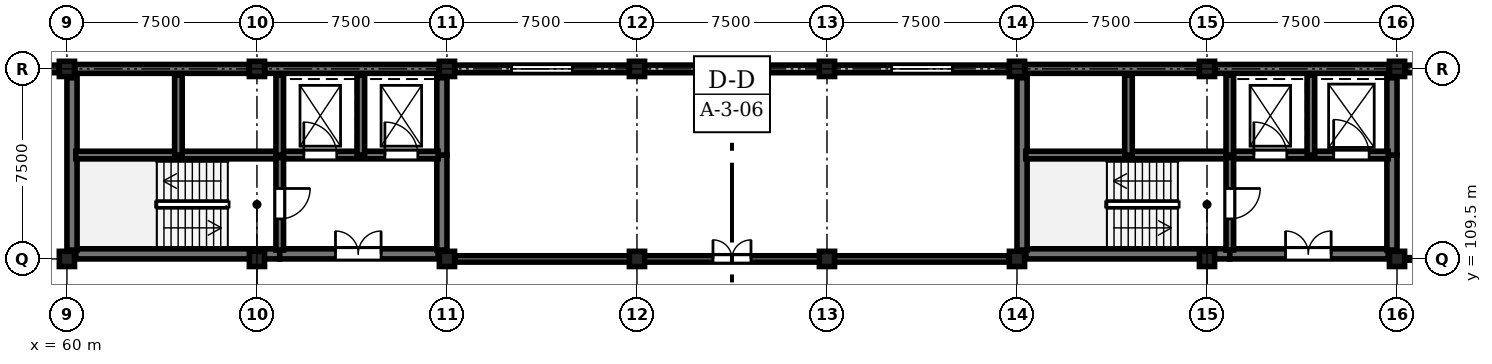
"""IFC4 building model, lengths in metres.
Left out: names, types, materials, properties, quantities, classifications, styles, units other than length and angle.
Written with IfcOpenShell. Run it as: python <this file> out.ifc"""

import sys

from ifc_helpers import new_model, si_unit, direction, frame, frame_2d, origin, origin_2d, place, context, subcontext, project, spatial, rectangle, circle, extrude, element, fill, save


model = new_model("IFC4")
c1 = context("Model", 3, precision=1e-05, world=origin(), true_north=direction((0.0, 1.0)))
c2 = subcontext(c1, "Body", "Model", "MODEL_VIEW")
j1 = project(units=[si_unit("LENGTHUNIT", "METRE"), si_unit("PLANEANGLEUNIT", "RADIAN")], contexts=[c1])
p1 = place(None, origin())
s1 = spatial("IfcSite", under=j1, at=p1, CompositionType="ELEMENT")
p2 = place(p1, origin())
s2 = spatial("IfcBuilding", under=s1, at=p2, CompositionType="ELEMENT")
p3 = place(p2, frame((0.0, 0.0, 14.1)))
s3 = spatial("IfcBuildingStorey", under=s2, at=p3, CompositionType="ELEMENT", Elevation=14.1)
for number, where, z_axis, x_axis in (
    (1, (60.0, 109.5, 0.0), (0.0, 0.0, 1.0), (1.0, 0.0, 0.0)),
    (2, (60.0, 117.0, 0.0), (0.0, 0.0, 1.0), (1.0, 0.0, 0.0)),
    (3, (67.5, 109.5, 0.0), (0.0, 0.0, 1.0), (1.0, 0.0, 0.0)),
):
    element("IfcColumn", number, at=place(p3, frame(where, z_axis=z_axis, x_axis=x_axis)), inside=s3, PredefinedType="COLUMN", context=c2, shape_type="SweptSolid", body=[
        extrude(rectangle(XDim=0.6, YDim=0.6, at=origin_2d()), origin(), (0.0, 0.0, 1.0), 3.75),
    ])
for number, where, z_axis, x_axis in (
    (4, (67.5, 117.0, 0.0), (0.0, 0.0, 1.0), (1.0, 0.0, 0.0)),
    (5, (75.0, 109.5, 0.0), (0.0, 0.0, 1.0), (1.0, 0.0, 0.0)),
):
    element("IfcColumn", number, at=place(p3, frame(where, z_axis=z_axis, x_axis=x_axis)), inside=s3, PredefinedType="COLUMN", context=c2, shape_type="SweptSolid", body=[
        extrude(circle(Radius=0.3, at=origin_2d()), origin(), (0.0, 0.0, 1.0), 3.75),
    ])
for number, where, z_axis, x_axis in (
    (6, (75.0, 117.0, 0.0), (0.0, 0.0, 1.0), (1.0, 0.0, 0.0)),
    (7, (82.5, 109.5, 0.0), (0.0, 0.0, 1.0), (1.0, 0.0, 0.0)),
    (8, (82.5, 117.0, 0.0), (0.0, 0.0, 1.0), (1.0, 0.0, 0.0)),
    (9, (90.0, 109.5, 0.0), (0.0, 0.0, 1.0), (1.0, 0.0, 0.0)),
):
    element("IfcColumn", number, at=place(p3, frame(where, z_axis=z_axis, x_axis=x_axis)), inside=s3, PredefinedType="COLUMN", context=c2, shape_type="SweptSolid", body=[
        extrude(rectangle(XDim=0.6, YDim=0.6, at=origin_2d()), origin(), (0.0, 0.0, 1.0), 3.75),
    ])
for number, where, z_axis, x_axis in (
    (10, (90.0, 117.0, 0.0), (0.0, 0.0, 1.0), (1.0, 0.0, 0.0)),
    (11, (97.5, 109.5, 0.0), (0.0, 0.0, 1.0), (1.0, 0.0, 0.0)),
):
    element("IfcColumn", number, at=place(p3, frame(where, z_axis=z_axis, x_axis=x_axis)), inside=s3, PredefinedType="COLUMN", context=c2, shape_type="SweptSolid", body=[
        extrude(circle(Radius=0.3, at=origin_2d()), origin(), (0.0, 0.0, 1.0), 3.75),
    ])
for number, where, z_axis, x_axis in (
    (12, (97.5, 117.0, 0.0), (0.0, 0.0, 1.0), (1.0, 0.0, 0.0)),
    (13, (105.0, 109.5, 0.0), (0.0, 0.0, 1.0), (1.0, 0.0, 0.0)),
    (14, (105.0, 117.0, 0.0), (0.0, 0.0, 1.0), (1.0, 0.0, 0.0)),
    (15, (112.5, 109.5, 0.0), (0.0, 0.0, 1.0), (1.0, 0.0, 0.0)),
):
    element("IfcColumn", number, at=place(p3, frame(where, z_axis=z_axis, x_axis=x_axis)), inside=s3, PredefinedType="COLUMN", context=c2, shape_type="SweptSolid", body=[
        extrude(rectangle(XDim=0.6, YDim=0.6, at=origin_2d()), origin(), (0.0, 0.0, 1.0), 3.75),
    ])
p4 = place(p3, frame((112.5, 117.0, 0.0), z_axis=(0.0, 0.0, 1.0), x_axis=(1.0, 0.0, 0.0)))
e16 = element("IfcColumn", 16, at=p4, inside=s3, PredefinedType="COLUMN", context=c2, shape_type="SweptSolid", body=[
    extrude(circle(Radius=0.3, at=origin_2d()), origin(), (0.0, 0.0, 1.0), 3.75),
])
p5 = place(p3, frame((52.785, 117.0, 0.0), z_axis=(0.0, 0.0, 1.0), x_axis=(1.0, 0.0, 0.0)))
e17 = element("IfcWall", 17, at=p5, inside=s3, PredefinedType="STANDARD", context=c2, shape_type="SweptSolid", body=[
    extrude(rectangle(XDim=6.905, YDim=0.3, at=frame_2d((3.453, 0.0))), origin(), (0.0, 0.0, 1.0), 2.87),
])
p6 = place(p5, frame((1.952, 0.0, 1.1)))
e18 = element("IfcOpeningElement", 18, at=p6, cuts=e17, PredefinedType="OPENING", context=c2, shape_type="SweptSolid", body=[
    extrude(rectangle(XDim=3.0, YDim=1.2, at=frame_2d((1.5, 0.6))), frame((0.0, 0.16, 0.0), z_axis=(0.0, -1.0, 0.0), x_axis=(1.0, 0.0, 0.0)), (0.0, 0.0, 1.0), 0.32),
])
for number, where, z_axis, x_axis in (
    (19, (60.31, 117.0, 0.0), (0.0, 0.0, 1.0), (1.0, 0.0, 0.0)),
    (20, (67.81, 117.0, 0.0), (0.0, 0.0, 1.0), (1.0, 0.0, 0.0)),
):
    element("IfcWall", number, at=place(p3, frame(where, z_axis=z_axis, x_axis=x_axis)), inside=s3, PredefinedType="SHEAR", context=c2, shape_type="SweptSolid", body=[
        extrude(rectangle(XDim=6.88, YDim=0.35, at=frame_2d((3.44, 0.0))), origin(), (0.0, 0.0, 1.0), 3.47),
    ])
p7 = place(p3, frame((75.31, 117.0, 0.0), z_axis=(0.0, 0.0, 1.0), x_axis=(1.0, 0.0, 0.0)))
e21 = element("IfcWall", 21, at=p7, inside=s3, PredefinedType="STANDARD", context=c2, shape_type="SweptSolid", body=[
    extrude(rectangle(XDim=6.88, YDim=0.3, at=frame_2d((3.44, 0.0))), origin(), (0.0, 0.0, 1.0), 2.87),
])
p8 = place(p7, frame((2.24, 0.0, 1.1)))
e22 = element("IfcOpeningElement", 22, at=p8, cuts=e21, PredefinedType="OPENING", context=c2, shape_type="SweptSolid", body=[
    extrude(rectangle(XDim=2.4, YDim=1.2, at=frame_2d((1.2, 0.6))), frame((0.0, 0.16, 0.0), z_axis=(0.0, -1.0, 0.0), x_axis=(1.0, 0.0, 0.0)), (0.0, 0.0, 1.0), 0.32),
])
p9 = place(p3, frame((82.81, 117.0, 0.0), z_axis=(0.0, 0.0, 1.0), x_axis=(1.0, 0.0, 0.0)))
e23 = element("IfcWall", 23, at=p9, inside=s3, PredefinedType="STANDARD", context=c2, shape_type="SweptSolid", body=[
    extrude(rectangle(XDim=6.88, YDim=0.3, at=frame_2d((3.44, 0.0))), origin(), (0.0, 0.0, 1.0), 2.87),
])
p10 = place(p9, frame((1.94, 0.0, 1.1)))
e24 = element("IfcOpeningElement", 24, at=p10, cuts=e23, PredefinedType="OPENING", context=c2, shape_type="SweptSolid", body=[
    extrude(rectangle(XDim=3.0, YDim=1.2, at=frame_2d((1.5, 0.6))), frame((0.0, 0.16, 0.0), z_axis=(0.0, -1.0, 0.0), x_axis=(1.0, 0.0, 0.0)), (0.0, 0.0, 1.0), 0.32),
])
p11 = place(p3, frame((90.31, 117.0, 0.0), z_axis=(0.0, 0.0, 1.0), x_axis=(1.0, 0.0, 0.0)))
e25 = element("IfcWall", 25, at=p11, inside=s3, PredefinedType="STANDARD", context=c2, shape_type="SweptSolid", body=[
    extrude(rectangle(XDim=6.88, YDim=0.3, at=frame_2d((3.44, 0.0))), origin(), (0.0, 0.0, 1.0), 2.87),
])
p12 = place(p11, frame((2.24, 0.0, 1.1)))
e26 = element("IfcOpeningElement", 26, at=p12, cuts=e25, PredefinedType="OPENING", context=c2, shape_type="SweptSolid", body=[
    extrude(rectangle(XDim=2.4, YDim=1.2, at=frame_2d((1.2, 0.6))), frame((0.0, 0.16, 0.0), z_axis=(0.0, -1.0, 0.0), x_axis=(1.0, 0.0, 0.0)), (0.0, 0.0, 1.0), 0.32),
])
for number, where, z_axis, x_axis in (
    (27, (97.81, 117.0, 0.0), (0.0, 0.0, 1.0), (1.0, 0.0, 0.0)),
    (28, (105.31, 117.0, 0.0), (0.0, 0.0, 1.0), (1.0, 0.0, 0.0)),
):
    element("IfcWall", number, at=place(p3, frame(where, z_axis=z_axis, x_axis=x_axis)), inside=s3, PredefinedType="SHEAR", context=c2, shape_type="SweptSolid", body=[
        extrude(rectangle(XDim=6.88, YDim=0.35, at=frame_2d((3.44, 0.0))), origin(), (0.0, 0.0, 1.0), 3.47),
    ])
p13 = place(p3, frame((112.81, 117.0, 0.0), z_axis=(0.0, 0.0, 1.0), x_axis=(1.0, 0.0, 0.0)))
e29 = element("IfcWall", 29, at=p13, inside=s3, PredefinedType="STANDARD", context=c2, shape_type="SweptSolid", body=[
    extrude(rectangle(XDim=6.93, YDim=0.3, at=frame_2d((3.465, 0.0))), origin(), (0.0, 0.0, 1.0), 2.87),
])
p14 = place(p13, frame((1.965, 0.0, 1.1)))
e30 = element("IfcOpeningElement", 30, at=p14, cuts=e29, PredefinedType="OPENING", context=c2, shape_type="SweptSolid", body=[
    extrude(rectangle(XDim=3.0, YDim=1.2, at=frame_2d((1.5, 0.6))), frame((0.0, 0.16, 0.0), z_axis=(0.0, -1.0, 0.0), x_axis=(1.0, 0.0, 0.0)), (0.0, 0.0, 1.0), 0.32),
])
p15 = place(p3, frame((60.35, 109.7, 0.0), z_axis=(0.0, 0.0, 1.0), x_axis=(1.0, 0.0, 0.0)))
e31 = element("IfcWall", 31, at=p15, inside=s3, PredefinedType="SHEAR", context=c2, shape_type="SweptSolid", body=[
    extrude(rectangle(XDim=8.05, YDim=0.4, at=frame_2d((4.025, 0.0))), origin(), (0.0, 0.0, 1.0), 3.47),
])
p16 = place(p3, frame((68.4, 109.7, 0.0), z_axis=(0.0, 0.0, 1.0), x_axis=(1.0, 0.0, 0.0)))
e32 = element("IfcWall", 32, at=p16, inside=s3, PredefinedType="SHEAR", context=c2, shape_type="SweptSolid", body=[
    extrude(rectangle(XDim=6.25, YDim=0.4, at=frame_2d((3.125, 0.0))), origin(), (0.0, 0.0, 1.0), 3.47),
])
p17 = place(p16, frame((2.2, 0.0, 0.0)))
e33 = element("IfcOpeningElement", 33, at=p17, cuts=e32, PredefinedType="OPENING", context=c2, shape_type="SweptSolid", body=[
    extrude(rectangle(XDim=1.8, YDim=2.25, at=frame_2d((0.9, 1.125))), frame((0.0, 0.21, 0.0), z_axis=(0.0, -1.0, 0.0), x_axis=(1.0, 0.0, 0.0)), (0.0, 0.0, 1.0), 0.42),
])
p18 = place(p3, frame((60.2, 109.85, 0.0), z_axis=(0.0, 0.0, 1.0), x_axis=(0.0, 1.0, 0.0)))
e34 = element("IfcWall", 34, at=p18, inside=s3, PredefinedType="SHEAR", context=c2, shape_type="SweptSolid", body=[
    extrude(rectangle(XDim=6.8, YDim=0.4, at=frame_2d((3.4, 0.0))), origin(), (0.0, 0.0, 1.0), 3.47),
])
p19 = place(p3, frame((74.8, 109.85, 0.0), z_axis=(0.0, 0.0, 1.0), x_axis=(0.0, 1.0, 0.0)))
e35 = element("IfcWall", 35, at=p19, inside=s3, PredefinedType="SHEAR", context=c2, shape_type="SweptSolid", body=[
    extrude(rectangle(XDim=3.75, YDim=0.4, at=frame_2d((1.875, 0.0))), origin(), (0.0, 0.0, 1.0), 3.47),
])
p20 = place(p3, frame((74.8, 113.6, 0.0), z_axis=(0.0, 0.0, 1.0), x_axis=(0.0, 1.0, 0.0)))
e36 = element("IfcWall", 36, at=p20, inside=s3, PredefinedType="SHEAR", context=c2, shape_type="SweptSolid", body=[
    extrude(rectangle(XDim=3.05, YDim=0.4, at=frame_2d((1.525, 0.0))), origin(), (0.0, 0.0, 1.0), 3.47),
])
p21 = place(p3, frame((60.35, 113.6, 0.0), z_axis=(0.0, 0.0, 1.0), x_axis=(1.0, 0.0, 0.0)))
e37 = element("IfcWall", 37, at=p21, inside=s3, PredefinedType="SHEAR", context=c2, shape_type="SweptSolid", body=[
    extrude(rectangle(XDim=8.05, YDim=0.3, at=frame_2d((4.025, 0.0))), origin(), (0.0, 0.0, 1.0), 3.47),
])
p22 = place(p3, frame((68.4, 113.6, 0.0), z_axis=(0.0, 0.0, 1.0), x_axis=(1.0, 0.0, 0.0)))
e38 = element("IfcWall", 38, at=p22, inside=s3, PredefinedType="SHEAR", context=c2, shape_type="SweptSolid", body=[
    extrude(rectangle(XDim=6.25, YDim=0.3, at=frame_2d((3.125, 0.0))), origin(), (0.0, 0.0, 1.0), 3.47),
])
p23 = place(p22, frame((0.95, 0.0, 0.0)))
e39 = element("IfcOpeningElement", 39, at=p23, cuts=e38, PredefinedType="OPENING", context=c2, shape_type="SweptSolid", body=[
    extrude(rectangle(XDim=1.3, YDim=2.2, at=frame_2d((0.65, 1.1))), frame((0.0, 0.16, 0.0), z_axis=(0.0, -1.0, 0.0), x_axis=(1.0, 0.0, 0.0)), (0.0, 0.0, 1.0), 0.32),
])
p24 = place(p22, frame((4.15, 0.0, 0.0)))
e40 = element("IfcOpeningElement", 40, at=p24, cuts=e38, PredefinedType="OPENING", context=c2, shape_type="SweptSolid", body=[
    extrude(rectangle(XDim=1.3, YDim=2.2, at=frame_2d((0.65, 1.1))), frame((0.0, 0.16, 0.0), z_axis=(0.0, -1.0, 0.0), x_axis=(1.0, 0.0, 0.0)), (0.0, 0.0, 1.0), 0.32),
])
p25 = place(p3, frame((68.4, 113.5, 0.0), z_axis=(0.0, 0.0, 1.0), x_axis=(0.0, -1.0, 0.0)))
e41 = element("IfcWall", 41, at=p25, inside=s3, PredefinedType="SHEAR", context=c2, shape_type="SweptSolid", body=[
    extrude(rectangle(XDim=3.65, YDim=0.3, at=frame_2d((1.825, 0.0))), origin(), (0.0, 0.0, 1.0), 3.47),
])
p26 = place(p25, frame((1.22, 0.0, 0.0)))
e42 = element("IfcOpeningElement", 42, at=p26, cuts=e41, PredefinedType="OPENING", context=c2, shape_type="SweptSolid", body=[
    extrude(rectangle(XDim=1.2, YDim=2.25, at=frame_2d((0.6, 1.125))), frame((0.0, 0.16, 0.0), z_axis=(0.0, -1.0, 0.0), x_axis=(1.0, 0.0, 0.0)), (0.0, 0.0, 1.0), 0.32),
])
for number, where, z_axis, x_axis in (
    (43, (64.4, 113.6, 0.0), (0.0, 0.0, 1.0), (0.0, 1.0, 0.0)),
    (44, (68.4, 113.6, 0.0), (0.0, 0.0, 1.0), (0.0, 1.0, 0.0)),
    (45, (71.6, 113.6, 0.0), (0.0, 0.0, 1.0), (0.0, 1.0, 0.0)),
):
    element("IfcWall", number, at=place(p3, frame(where, z_axis=z_axis, x_axis=x_axis)), inside=s3, PredefinedType="SHEAR", context=c2, shape_type="SweptSolid", body=[
        extrude(rectangle(XDim=3.15, YDim=0.3, at=frame_2d((1.575, 0.0))), origin(), (0.0, 0.0, 1.0), 3.47),
    ])
p27 = place(p3, frame((97.85, 109.7, 0.0), z_axis=(0.0, 0.0, 1.0), x_axis=(1.0, 0.0, 0.0)))
e46 = element("IfcWall", 46, at=p27, inside=s3, PredefinedType="SHEAR", context=c2, shape_type="SweptSolid", body=[
    extrude(rectangle(XDim=8.05, YDim=0.4, at=frame_2d((4.025, 0.0))), origin(), (0.0, 0.0, 1.0), 3.47),
])
p28 = place(p3, frame((105.9, 109.7, 0.0), z_axis=(0.0, 0.0, 1.0), x_axis=(1.0, 0.0, 0.0)))
e47 = element("IfcWall", 47, at=p28, inside=s3, PredefinedType="SHEAR", context=c2, shape_type="SweptSolid", body=[
    extrude(rectangle(XDim=6.25, YDim=0.4, at=frame_2d((3.125, 0.0))), origin(), (0.0, 0.0, 1.0), 3.47),
])
p29 = place(p28, frame((2.2, 0.0, 0.0)))
e48 = element("IfcOpeningElement", 48, at=p29, cuts=e47, PredefinedType="OPENING", context=c2, shape_type="SweptSolid", body=[
    extrude(rectangle(XDim=1.8, YDim=2.25, at=frame_2d((0.9, 1.125))), frame((0.0, 0.21, 0.0), z_axis=(0.0, -1.0, 0.0), x_axis=(1.0, 0.0, 0.0)), (0.0, 0.0, 1.0), 0.42),
])
p30 = place(p3, frame((97.7, 109.85, 0.0), z_axis=(0.0, 0.0, 1.0), x_axis=(0.0, 1.0, 0.0)))
e49 = element("IfcWall", 49, at=p30, inside=s3, PredefinedType="SHEAR", context=c2, shape_type="SweptSolid", body=[
    extrude(rectangle(XDim=6.8, YDim=0.4, at=frame_2d((3.4, 0.0))), origin(), (0.0, 0.0, 1.0), 3.47),
])
p31 = place(p3, frame((112.3, 109.85, 0.0), z_axis=(0.0, 0.0, 1.0), x_axis=(0.0, 1.0, 0.0)))
e50 = element("IfcWall", 50, at=p31, inside=s3, PredefinedType="SHEAR", context=c2, shape_type="SweptSolid", body=[
    extrude(rectangle(XDim=3.75, YDim=0.4, at=frame_2d((1.875, 0.0))), origin(), (0.0, 0.0, 1.0), 3.47),
])
p32 = place(p3, frame((112.3, 113.6, 0.0), z_axis=(0.0, 0.0, 1.0), x_axis=(0.0, 1.0, 0.0)))
e51 = element("IfcWall", 51, at=p32, inside=s3, PredefinedType="SHEAR", context=c2, shape_type="SweptSolid", body=[
    extrude(rectangle(XDim=3.05, YDim=0.4, at=frame_2d((1.525, 0.0))), origin(), (0.0, 0.0, 1.0), 3.47),
])
p33 = place(p3, frame((97.85, 113.6, 0.0), z_axis=(0.0, 0.0, 1.0), x_axis=(1.0, 0.0, 0.0)))
e52 = element("IfcWall", 52, at=p33, inside=s3, PredefinedType="SHEAR", context=c2, shape_type="SweptSolid", body=[
    extrude(rectangle(XDim=8.05, YDim=0.3, at=frame_2d((4.025, 0.0))), origin(), (0.0, 0.0, 1.0), 3.47),
])
p34 = place(p3, frame((105.9, 113.6, 0.0), z_axis=(0.0, 0.0, 1.0), x_axis=(1.0, 0.0, 0.0)))
e53 = element("IfcWall", 53, at=p34, inside=s3, PredefinedType="SHEAR", context=c2, shape_type="SweptSolid", body=[
    extrude(rectangle(XDim=6.25, YDim=0.3, at=frame_2d((3.125, 0.0))), origin(), (0.0, 0.0, 1.0), 3.47),
])
p35 = place(p34, frame((0.95, 0.0, 0.0)))
e54 = element("IfcOpeningElement", 54, at=p35, cuts=e53, PredefinedType="OPENING", context=c2, shape_type="SweptSolid", body=[
    extrude(rectangle(XDim=1.3, YDim=2.2, at=frame_2d((0.65, 1.1))), frame((0.0, 0.16, 0.0), z_axis=(0.0, -1.0, 0.0), x_axis=(1.0, 0.0, 0.0)), (0.0, 0.0, 1.0), 0.32),
])
p36 = place(p34, frame((4.1, 0.0, 0.0)))
e55 = element("IfcOpeningElement", 55, at=p36, cuts=e53, PredefinedType="OPENING", context=c2, shape_type="SweptSolid", body=[
    extrude(rectangle(XDim=1.4, YDim=2.25, at=frame_2d((0.7, 1.125))), frame((0.0, 0.16, 0.0), z_axis=(0.0, -1.0, 0.0), x_axis=(1.0, 0.0, 0.0)), (0.0, 0.0, 1.0), 0.32),
])
p37 = place(p3, frame((105.9, 113.5, 0.0), z_axis=(0.0, 0.0, 1.0), x_axis=(0.0, -1.0, 0.0)))
e56 = element("IfcWall", 56, at=p37, inside=s3, PredefinedType="SHEAR", context=c2, shape_type="SweptSolid", body=[
    extrude(rectangle(XDim=3.65, YDim=0.3, at=frame_2d((1.825, 0.0))), origin(), (0.0, 0.0, 1.0), 3.47),
])
p38 = place(p37, frame((1.22, 0.0, 0.0)))
e57 = element("IfcOpeningElement", 57, at=p38, cuts=e56, PredefinedType="OPENING", context=c2, shape_type="SweptSolid", body=[
    extrude(rectangle(XDim=1.2, YDim=2.25, at=frame_2d((0.6, 1.125))), frame((0.0, 0.16, 0.0), z_axis=(0.0, -1.0, 0.0), x_axis=(1.0, 0.0, 0.0)), (0.0, 0.0, 1.0), 0.32),
])
for number, where, z_axis, x_axis in (
    (58, (101.9, 113.6, 0.0), (0.0, 0.0, 1.0), (0.0, 1.0, 0.0)),
    (59, (105.9, 113.6, 0.0), (0.0, 0.0, 1.0), (0.0, 1.0, 0.0)),
    (60, (109.1, 113.6, 0.0), (0.0, 0.0, 1.0), (0.0, 1.0, 0.0)),
):
    element("IfcWall", number, at=place(p3, frame(where, z_axis=z_axis, x_axis=x_axis)), inside=s3, PredefinedType="SHEAR", context=c2, shape_type="SweptSolid", body=[
        extrude(rectangle(XDim=3.15, YDim=0.3, at=frame_2d((1.575, 0.0))), origin(), (0.0, 0.0, 1.0), 3.47),
    ])
p39 = place(p3, frame((75.3, 109.5, 0.0), z_axis=(0.0, 0.0, 1.0), x_axis=(1.0, 0.0, 0.0)))
e61 = element("IfcWall", 61, at=p39, inside=s3, PredefinedType="STANDARD", context=c2, shape_type="SweptSolid", body=[
    extrude(rectangle(XDim=21.9, YDim=0.25, at=frame_2d((10.95, 0.0))), origin(), (0.0, 0.0, 1.0), 2.855),
])
p40 = place(p39, frame((10.2, 0.0, 0.0)))
e62 = element("IfcOpeningElement", 62, at=p40, cuts=e61, PredefinedType="OPENING", context=c2, shape_type="SweptSolid", body=[
    extrude(rectangle(XDim=1.5, YDim=2.3, at=frame_2d((0.75, 1.15))), frame((0.0, 0.135, 0.0), z_axis=(0.0, -1.0, 0.0), x_axis=(1.0, 0.0, 0.0)), (0.0, 0.0, 1.0), 0.27),
])
p41 = place(p3, frame((112.8, 109.5, 0.0), z_axis=(0.0, 0.0, 1.0), x_axis=(1.0, 0.0, 0.0)))
e63 = element("IfcWall", 63, at=p41, inside=s3, PredefinedType="PARTITIONING", context=c2, shape_type="SweptSolid", body=[
    extrude(rectangle(XDim=14.35, YDim=0.1, at=frame_2d((7.175, 0.0))), origin(), (0.0, 0.0, 1.0), 2.855),
])
p42 = place(p41, frame((10.49, 0.0, 0.0)))
e64 = element("IfcOpeningElement", 64, at=p42, cuts=e63, PredefinedType="OPENING", context=c2, shape_type="SweptSolid", body=[
    extrude(rectangle(XDim=1.05, YDim=2.2, at=frame_2d((0.525, 1.1))), frame((0.0, 0.06, 0.0), z_axis=(0.0, -1.0, 0.0), x_axis=(1.0, 0.0, 0.0)), (0.0, 0.0, 1.0), 0.12),
])
p43 = place(p8, origin())
e65 = element("IfcWindow", 65, at=p43, inside=s3, PartitioningType="SINGLE_PANEL", PredefinedType="WINDOW", context=c2, shape_type="SweptSolid", body=[
    extrude(rectangle(XDim=2.4, YDim=1.2, at=frame_2d((1.2, 0.6))), frame((0.0, 0.03, 0.0), z_axis=(0.0, -1.0, 0.0), x_axis=(1.0, 0.0, 0.0)), (0.0, 0.0, 1.0), 0.06),
])
fill(e22, e65)
p44 = place(p10, origin())
e66 = element("IfcWindow", 66, at=p44, inside=s3, PartitioningType="SINGLE_PANEL", PredefinedType="WINDOW", context=c2, shape_type="SweptSolid", body=[
    extrude(rectangle(XDim=3.0, YDim=1.2, at=frame_2d((1.5, 0.6))), frame((0.0, 0.03, 0.0), z_axis=(0.0, -1.0, 0.0), x_axis=(1.0, 0.0, 0.0)), (0.0, 0.0, 1.0), 0.06),
])
fill(e24, e66)
p45 = place(p12, origin())
e67 = element("IfcWindow", 67, at=p45, inside=s3, PartitioningType="SINGLE_PANEL", PredefinedType="WINDOW", context=c2, shape_type="SweptSolid", body=[
    extrude(rectangle(XDim=2.4, YDim=1.2, at=frame_2d((1.2, 0.6))), frame((0.0, 0.03, 0.0), z_axis=(0.0, -1.0, 0.0), x_axis=(1.0, 0.0, 0.0)), (0.0, 0.0, 1.0), 0.06),
])
fill(e26, e67)
p46 = place(p17, origin())
e68 = element("IfcDoor", 68, at=p46, inside=s3, OperationType="DOUBLE_DOOR_SINGLE_SWING", PredefinedType="DOOR", context=c2, shape_type="SweptSolid", body=[
    extrude(rectangle(XDim=1.8, YDim=2.25, at=frame_2d((0.9, 1.125))), frame((0.0, 0.025, 0.0), z_axis=(0.0, -1.0, 0.0), x_axis=(1.0, 0.0, 0.0)), (0.0, 0.0, 1.0), 0.05),
])
fill(e33, e68)
p47 = place(p23, origin())
e69 = element("IfcDoor", 69, at=p47, inside=s3, OperationType="DOUBLE_DOOR_SLIDING", PredefinedType="DOOR", context=c2, shape_type="SweptSolid", body=[
    extrude(rectangle(XDim=1.3, YDim=2.2, at=frame_2d((0.65, 1.1))), frame((0.0, 0.025, 0.0), z_axis=(0.0, -1.0, 0.0), x_axis=(1.0, 0.0, 0.0)), (0.0, 0.0, 1.0), 0.05),
])
fill(e39, e69)
p48 = place(p24, origin())
e70 = element("IfcDoor", 70, at=p48, inside=s3, OperationType="DOUBLE_DOOR_SLIDING", PredefinedType="DOOR", context=c2, shape_type="SweptSolid", body=[
    extrude(rectangle(XDim=1.3, YDim=2.2, at=frame_2d((0.65, 1.1))), frame((0.0, 0.025, 0.0), z_axis=(0.0, -1.0, 0.0), x_axis=(1.0, 0.0, 0.0)), (0.0, 0.0, 1.0), 0.05),
])
fill(e40, e70)
p49 = place(p26, origin())
e71 = element("IfcDoor", 71, at=p49, inside=s3, OperationType="SINGLE_SWING_LEFT", PredefinedType="DOOR", context=c2, shape_type="SweptSolid", body=[
    extrude(rectangle(XDim=1.2, YDim=2.25, at=frame_2d((0.6, 1.125))), frame((0.0, 0.025, 0.0), z_axis=(0.0, -1.0, 0.0), x_axis=(1.0, 0.0, 0.0)), (0.0, 0.0, 1.0), 0.05),
])
fill(e42, e71)
p50 = place(p29, origin())
e72 = element("IfcDoor", 72, at=p50, inside=s3, OperationType="DOUBLE_DOOR_SINGLE_SWING", PredefinedType="DOOR", context=c2, shape_type="SweptSolid", body=[
    extrude(rectangle(XDim=1.8, YDim=2.25, at=frame_2d((0.9, 1.125))), frame((0.0, 0.025, 0.0), z_axis=(0.0, -1.0, 0.0), x_axis=(1.0, 0.0, 0.0)), (0.0, 0.0, 1.0), 0.05),
])
fill(e48, e72)
p51 = place(p35, origin())
e73 = element("IfcDoor", 73, at=p51, inside=s3, OperationType="DOUBLE_DOOR_SLIDING", PredefinedType="DOOR", context=c2, shape_type="SweptSolid", body=[
    extrude(rectangle(XDim=1.3, YDim=2.2, at=frame_2d((0.65, 1.1))), frame((0.0, 0.025, 0.0), z_axis=(0.0, -1.0, 0.0), x_axis=(1.0, 0.0, 0.0)), (0.0, 0.0, 1.0), 0.05),
])
fill(e54, e73)
p52 = place(p36, origin())
e74 = element("IfcDoor", 74, at=p52, inside=s3, OperationType="DOUBLE_DOOR_SLIDING", PredefinedType="DOOR", context=c2, shape_type="SweptSolid", body=[
    extrude(rectangle(XDim=1.4, YDim=2.25, at=frame_2d((0.7, 1.125))), frame((0.0, 0.025, 0.0), z_axis=(0.0, -1.0, 0.0), x_axis=(1.0, 0.0, 0.0)), (0.0, 0.0, 1.0), 0.05),
])
fill(e55, e74)
p53 = place(p38, origin())
e75 = element("IfcDoor", 75, at=p53, inside=s3, OperationType="SINGLE_SWING_LEFT", PredefinedType="DOOR", context=c2, shape_type="SweptSolid", body=[
    extrude(rectangle(XDim=1.2, YDim=2.25, at=frame_2d((0.6, 1.125))), frame((0.0, 0.025, 0.0), z_axis=(0.0, -1.0, 0.0), x_axis=(1.0, 0.0, 0.0)), (0.0, 0.0, 1.0), 0.05),
])
fill(e57, e75)
p54 = place(p40, origin())
e76 = element("IfcDoor", 76, at=p54, inside=s3, OperationType="DOUBLE_DOOR_SINGLE_SWING", PredefinedType="DOOR", context=c2, shape_type="SweptSolid", body=[
    extrude(rectangle(XDim=1.5, YDim=2.3, at=frame_2d((0.75, 1.15))), frame((0.0, 0.025, 0.0), z_axis=(0.0, -1.0, 0.0), x_axis=(1.0, 0.0, 0.0)), (0.0, 0.0, 1.0), 0.05),
])
fill(e62, e76)
save(model, sys.argv[1])
